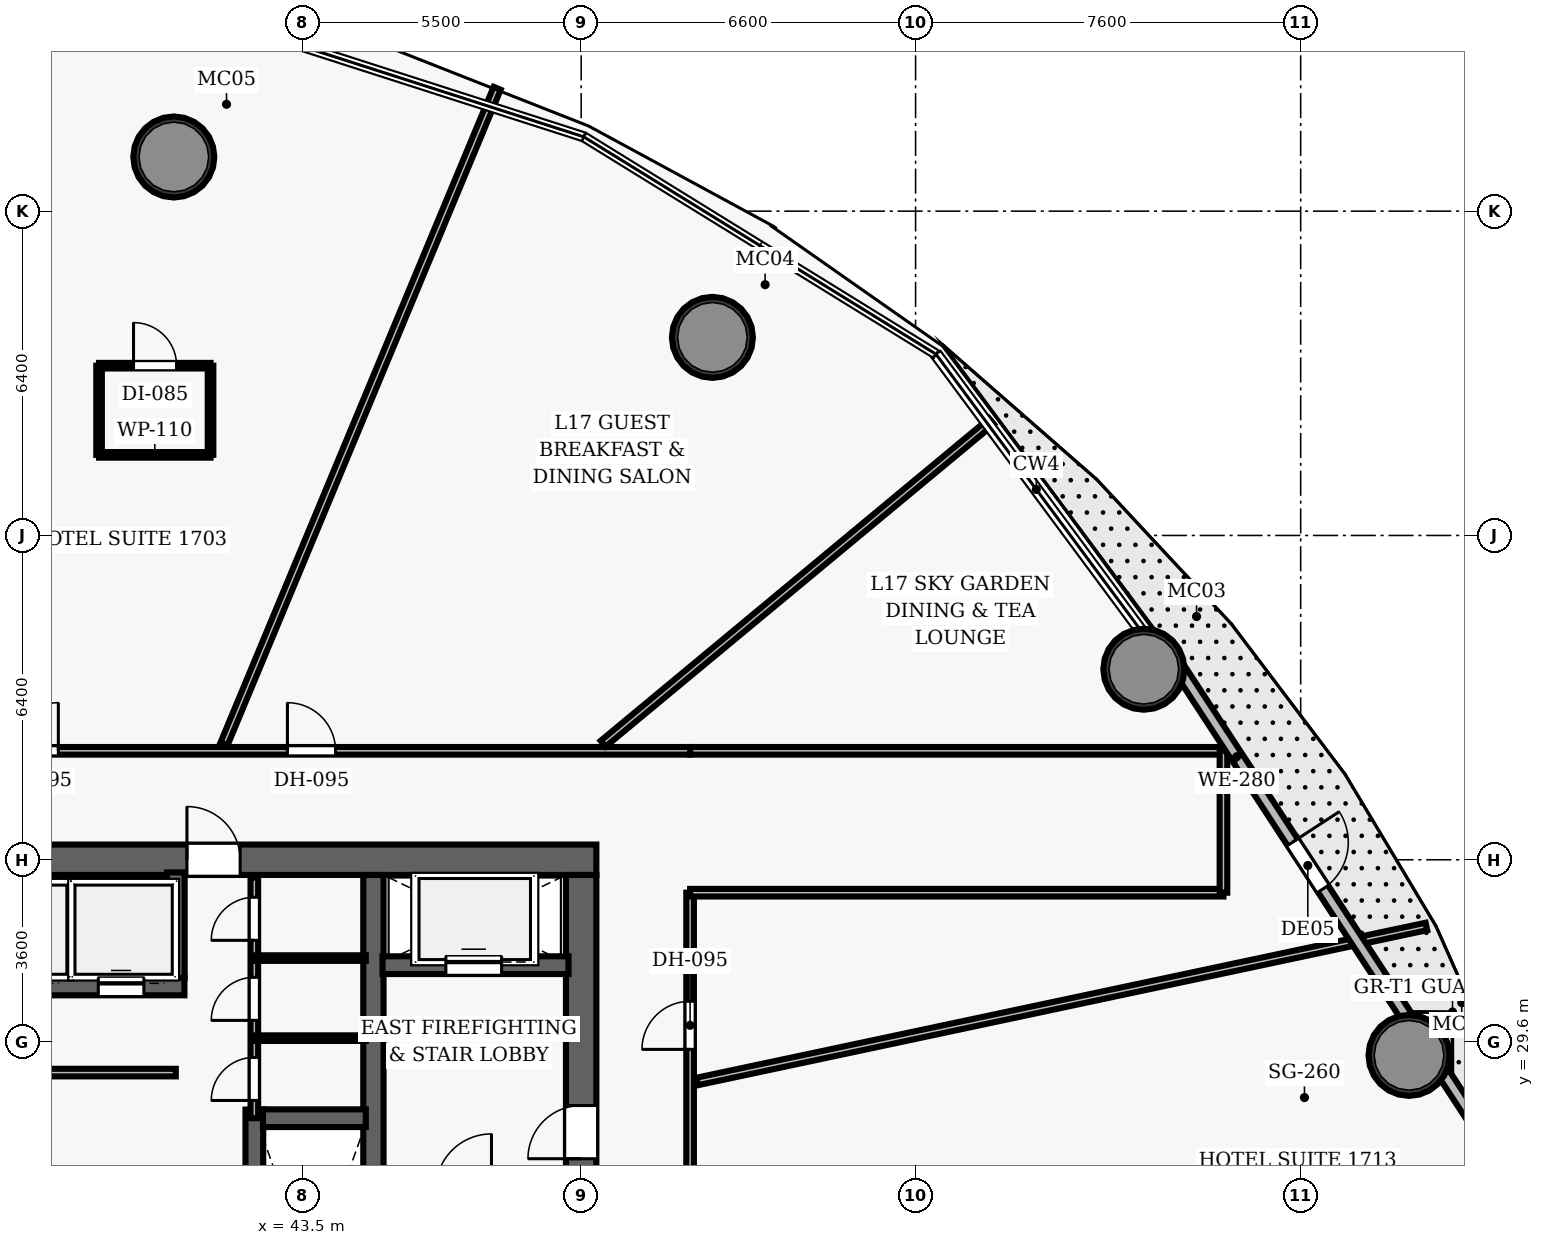
"""IFC4 building model, lengths in metres.
Left out: names, types, materials, properties, quantities, classifications, styles, units other than length and angle.
Written with IfcOpenShell. Run it as: python <this file> out.ifc"""

import sys

from ifc_helpers import new_model, si_unit, direction, frame, frame_2d, origin, origin_2d, place, context, subcontext, project, spatial, rectangle, hollow_circle, extrude, element, fill, save


model = new_model("IFC4")
c1 = context("Model", 3, precision=1e-05, world=origin(), true_north=direction((0.0, 1.0)))
c2 = subcontext(c1, "Body", "Model", "MODEL_VIEW")
j1 = project(units=[si_unit("LENGTHUNIT", "METRE"), si_unit("PLANEANGLEUNIT", "RADIAN")], contexts=[c1])
p1 = place(None, origin())
s1 = spatial("IfcSite", under=j1, at=p1, CompositionType="ELEMENT")
p2 = place(p1, origin())
s2 = spatial("IfcBuilding", under=s1, at=p2, CompositionType="ELEMENT")
p3 = place(p2, frame((0.0, 0.0, 76.4)))
s3 = spatial("IfcBuildingStorey", under=s2, at=p3, CompositionType="ELEMENT", Elevation=76.4)
p4 = place(p3, frame((26.7, 33.2, 0.0), z_axis=(0.0, 0.0, 1.0), x_axis=(1.0, 0.0, 0.0)))
e1 = element("IfcWall", 1, at=p4, inside=s3, PredefinedType="SHEAR", context=c2, shape_type="SweptSolid", body=[
    extrude(rectangle(XDim=22.6, YDim=0.6, at=frame_2d((11.3, 0.0))), origin(), (0.0, 0.0, 1.0), 3.5),
])
p5 = place(p4, frame((4.62, 0.0, 0.0)))
e2 = element("IfcOpeningElement", 2, at=p5, cuts=e1, PredefinedType="OPENING", context=c2, shape_type="SweptSolid", body=[
    extrude(rectangle(XDim=1.05, YDim=2.15, at=frame_2d((0.525, 1.075))), frame((0.0, 0.31, 0.0), z_axis=(0.0, -1.0, 0.0), x_axis=(1.0, 0.0, 0.0)), (0.0, 0.0, 1.0), 0.62),
])
p6 = place(p4, frame((14.52, 0.0, 0.0)))
e3 = element("IfcOpeningElement", 3, at=p6, cuts=e1, PredefinedType="OPENING", context=c2, shape_type="SweptSolid", body=[
    extrude(rectangle(XDim=1.05, YDim=2.15, at=frame_2d((0.525, 1.075))), frame((0.0, 0.31, 0.0), z_axis=(0.0, -1.0, 0.0), x_axis=(1.0, 0.0, 0.0)), (0.0, 0.0, 1.0), 0.62),
])
p7 = place(p3, frame((49.0, 19.1, 0.0), z_axis=(0.0, 0.0, 1.0), x_axis=(0.0, 1.0, 0.0)))
e4 = element("IfcWall", 4, at=p7, inside=s3, PredefinedType="SHEAR", context=c2, shape_type="SweptSolid", body=[
    extrude(rectangle(XDim=13.8, YDim=0.6, at=frame_2d((6.9, 0.0))), origin(), (0.0, 0.0, 1.0), 3.5),
])
p8 = place(p7, frame((8.2, 0.0, 0.0)))
e5 = element("IfcOpeningElement", 5, at=p8, cuts=e4, PredefinedType="OPENING", context=c2, shape_type="SweptSolid", body=[
    extrude(rectangle(XDim=1.05, YDim=2.15, at=frame_2d((0.525, 1.075))), frame((0.0, 0.31, 0.0), z_axis=(0.0, -1.0, 0.0), x_axis=(1.0, 0.0, 0.0)), (0.0, 0.0, 1.0), 0.62),
])
p9 = place(p3, frame((44.9, 19.1, 0.0), z_axis=(0.0, 0.0, 1.0), x_axis=(0.0, 1.0, 0.0)))
e6 = element("IfcWall", 6, at=p9, inside=s3, PredefinedType="SHEAR", context=c2, shape_type="SweptSolid", body=[
    extrude(rectangle(XDim=13.8, YDim=0.4, at=frame_2d((6.9, 0.0))), origin(), (0.0, 0.0, 1.0), 3.5),
])
for number, where, z_axis, x_axis in (
    (7, (65.339, 29.34, 0.0), (0.0, 0.0, 1.0), (1.0, 0.0, 0.0)),
    (8, (60.105, 36.96, 0.0), (0.0, 0.0, 1.0), (1.0, 0.0, 0.0)),
    (9, (51.59, 43.509, 0.0), (0.0, 0.0, 1.0), (1.0, 0.0, 0.0)),
    (10, (40.961, 47.069, 0.0), (0.0, 0.0, 1.0), (1.0, 0.0, 0.0)),
):
    element("IfcColumn", number, at=place(p3, frame(where, z_axis=z_axis, x_axis=x_axis)), inside=s3, PredefinedType="COLUMN", context=c2, shape_type="SweptSolid", body=[
        extrude(hollow_circle(Radius=0.8, WallThickness=0.06, at=origin_2d()), origin(), (0.0, 0.0, 1.0), 3.5),
    ])
p10 = place(p3, frame((45.08, 31.12, 0.0), z_axis=(0.0, 0.0, 1.0), x_axis=(1.0, 0.0, 0.0)))
e11 = element("IfcWall", 11, at=p10, inside=s3, PredefinedType="SHEAR", context=c2, shape_type="SweptSolid", body=[
    extrude(rectangle(XDim=3.67, YDim=0.35, at=frame_2d((1.835, 0.0))), origin(), (0.0, 0.0, 1.0), 2.6),
])
p11 = place(p10, frame((1.25, 0.0, 0.0)))
e12 = element("IfcOpeningElement", 12, at=p11, cuts=e11, PredefinedType="OPENING", context=c2, shape_type="SweptSolid", body=[
    extrude(rectangle(XDim=1.1, YDim=2.15, at=frame_2d((0.55, 1.075))), frame((0.0, 0.185, 0.0), z_axis=(0.0, -1.0, 0.0), x_axis=(1.0, 0.0, 0.0)), (0.0, 0.0, 1.0), 0.37),
])
p12 = place(p3, frame((42.55, 21.73, 0.0), z_axis=(0.0, 0.0, 1.0), x_axis=(0.0, 1.0, 0.0)))
e13 = element("IfcWall", 13, at=p12, inside=s3, PredefinedType="SHEAR", context=c2, shape_type="SweptSolid", body=[
    extrude(rectangle(XDim=6.54, YDim=0.35, at=frame_2d((3.27, 0.0))), origin(), (0.0, 0.0, 1.0), 2.6),
])
p13 = place(p3, frame((42.72, 28.1, 0.0), z_axis=(0.0, 0.0, 1.0), x_axis=(1.0, 0.0, 0.0)))
e14 = element("IfcWall", 14, at=p13, inside=s3, PredefinedType="SHEAR", context=c2, shape_type="SweptSolid", body=[
    extrude(rectangle(XDim=2.03, YDim=0.35, at=frame_2d((1.015, 0.0))), origin(), (0.0, 0.0, 1.0), 2.6),
])
p14 = place(p3, frame((34.81, 30.7, 0.0), z_axis=(0.0, 0.0, 1.0), x_axis=(1.0, 0.0, 0.0)))
e15 = element("IfcWall", 15, at=p14, inside=s3, PredefinedType="SHEAR", context=c2, shape_type="SweptSolid", body=[
    extrude(rectangle(XDim=6.36, YDim=0.35, at=frame_2d((3.18, 0.0))), origin(), (0.0, 0.0, 1.0), 2.6),
])
p15 = place(p14, frame((0.5, 0.0, 0.0)))
e16 = element("IfcOpeningElement", 16, at=p15, cuts=e15, PredefinedType="OPENING", context=c2, shape_type="SweptSolid", body=[
    extrude(rectangle(XDim=0.9, YDim=2.15, at=frame_2d((0.45, 1.075))), frame((0.0, 0.185, 0.0), z_axis=(0.0, -1.0, 0.0), x_axis=(1.0, 0.0, 0.0)), (0.0, 0.0, 1.0), 0.37),
])
p16 = place(p14, frame((2.58, 0.0, 0.0)))
e17 = element("IfcOpeningElement", 17, at=p16, cuts=e15, PredefinedType="OPENING", context=c2, shape_type="SweptSolid", body=[
    extrude(rectangle(XDim=0.9, YDim=2.15, at=frame_2d((0.45, 1.075))), frame((0.0, 0.185, 0.0), z_axis=(0.0, -1.0, 0.0), x_axis=(1.0, 0.0, 0.0)), (0.0, 0.0, 1.0), 0.37),
])
p17 = place(p14, frame((4.66, 0.0, 0.0)))
e18 = element("IfcOpeningElement", 18, at=p17, cuts=e15, PredefinedType="OPENING", context=c2, shape_type="SweptSolid", body=[
    extrude(rectangle(XDim=0.9, YDim=2.15, at=frame_2d((0.45, 1.075))), frame((0.0, 0.185, 0.0), z_axis=(0.0, -1.0, 0.0), x_axis=(1.0, 0.0, 0.0)), (0.0, 0.0, 1.0), 0.37),
])
p18 = place(p3, frame((41.0, 30.87, 0.0), z_axis=(0.0, 0.0, 1.0), x_axis=(0.0, 1.0, 0.0)))
e19 = element("IfcWall", 19, at=p18, inside=s3, PredefinedType="SHEAR", context=c2, shape_type="SweptSolid", body=[
    extrude(rectangle(XDim=2.08, YDim=0.35, at=frame_2d((1.04, 0.0))), origin(), (0.0, 0.0, 1.0), 2.6),
])
p19 = place(p3, frame((34.75, 29.0, 0.0), z_axis=(0.0, 0.0, 1.0), x_axis=(1.0, 0.0, 0.0)))
e20 = element("IfcWall", 20, at=p19, inside=s3, PredefinedType="PARTITIONING", context=c2, shape_type="SweptSolid", body=[
    extrude(rectangle(XDim=6.25, YDim=0.15, at=frame_2d((3.125, 0.0))), origin(), (0.0, 0.0, 1.0), 2.6),
])
p20 = place(p3, frame((42.55, 28.1, 0.0), z_axis=(0.0, 0.0, 1.0), x_axis=(0.0, 1.0, 0.0)))
e21 = element("IfcWall", 21, at=p20, inside=s3, PredefinedType="PARTITIONING", context=c2, shape_type="SweptSolid", body=[
    extrude(rectangle(XDim=4.75, YDim=0.15, at=frame_2d((2.375, 0.0))), origin(), (0.0, 0.0, 1.0), 2.6),
])
p21 = place(p20, frame((0.35, 0.0, 0.0)))
e22 = element("IfcOpeningElement", 22, at=p21, cuts=e21, PredefinedType="OPENING", context=c2, shape_type="SweptSolid", body=[
    extrude(rectangle(XDim=0.85, YDim=2.1, at=frame_2d((0.425, 1.05))), frame((0.0, 0.085, 0.0), z_axis=(0.0, -1.0, 0.0), x_axis=(1.0, 0.0, 0.0)), (0.0, 0.0, 1.0), 0.17),
])
p22 = place(p20, frame((1.93, 0.0, 0.0)))
e23 = element("IfcOpeningElement", 23, at=p22, cuts=e21, PredefinedType="OPENING", context=c2, shape_type="SweptSolid", body=[
    extrude(rectangle(XDim=0.85, YDim=2.1, at=frame_2d((0.425, 1.05))), frame((0.0, 0.085, 0.0), z_axis=(0.0, -1.0, 0.0), x_axis=(1.0, 0.0, 0.0)), (0.0, 0.0, 1.0), 0.17),
])
p23 = place(p20, frame((3.51, 0.0, 0.0)))
e24 = element("IfcOpeningElement", 24, at=p23, cuts=e21, PredefinedType="OPENING", context=c2, shape_type="SweptSolid", body=[
    extrude(rectangle(XDim=0.85, YDim=2.1, at=frame_2d((0.425, 1.05))), frame((0.0, 0.085, 0.0), z_axis=(0.0, -1.0, 0.0), x_axis=(1.0, 0.0, 0.0)), (0.0, 0.0, 1.0), 0.17),
])
for number, where, z_axis, x_axis in (
    (25, (42.55, 29.68, 0.0), (0.0, 0.0, 1.0), (1.0, 0.0, 0.0)),
    (26, (42.55, 31.26, 0.0), (0.0, 0.0, 1.0), (1.0, 0.0, 0.0)),
):
    element("IfcWall", number, at=place(p3, frame(where, z_axis=z_axis, x_axis=x_axis)), inside=s3, PredefinedType="PARTITIONING", context=c2, shape_type="SweptSolid", body=[
        extrude(rectangle(XDim=2.2, YDim=0.11, at=frame_2d((1.1, 0.0))), origin(), (0.0, 0.0, 1.0), 2.6),
    ])
p24 = place(p3, frame((27.65, 35.35, 0.0), z_axis=(0.0, 0.0, 1.0), x_axis=(1.0, 0.0, 0.0)))
e27 = element("IfcWall", 27, at=p24, inside=s3, PredefinedType="PARTITIONING", context=c2, shape_type="SweptSolid", body=[
    extrude(rectangle(XDim=23.5, YDim=0.15, at=frame_2d((11.75, 0.0))), origin(), (0.0, 0.0, 1.0), 2.6),
])
p25 = place(p24, frame((15.553, 0.0, 0.0)))
e28 = element("IfcOpeningElement", 28, at=p25, cuts=e27, PredefinedType="OPENING", context=c2, shape_type="SweptSolid", body=[
    extrude(rectangle(XDim=0.95, YDim=2.15, at=frame_2d((0.475, 1.075))), frame((0.0, 0.085, 0.0), z_axis=(0.0, -1.0, 0.0), x_axis=(1.0, 0.0, 0.0)), (0.0, 0.0, 1.0), 0.17),
])
p26 = place(p24, frame((10.082, 0.0, 0.0)))
e29 = element("IfcOpeningElement", 29, at=p26, cuts=e27, PredefinedType="OPENING", context=c2, shape_type="SweptSolid", body=[
    extrude(rectangle(XDim=0.95, YDim=2.15, at=frame_2d((0.475, 1.075))), frame((0.0, 0.085, 0.0), z_axis=(0.0, -1.0, 0.0), x_axis=(1.0, 0.0, 0.0)), (0.0, 0.0, 1.0), 0.17),
])
p27 = place(p24, frame((7.866, 0.0, 0.0)))
e30 = element("IfcOpeningElement", 30, at=p27, cuts=e27, PredefinedType="OPENING", context=c2, shape_type="SweptSolid", body=[
    extrude(rectangle(XDim=0.95, YDim=2.15, at=frame_2d((0.475, 1.075))), frame((0.0, 0.085, 0.0), z_axis=(0.0, -1.0, 0.0), x_axis=(1.0, 0.0, 0.0)), (0.0, 0.0, 1.0), 0.17),
])
p28 = place(p3, frame((51.15, 16.65, 0.0), z_axis=(0.0, 0.0, 1.0), x_axis=(0.0, 1.0, 0.0)))
e31 = element("IfcWall", 31, at=p28, inside=s3, PredefinedType="PARTITIONING", context=c2, shape_type="SweptSolid", body=[
    extrude(rectangle(XDim=15.9, YDim=0.15, at=frame_2d((7.95, 0.0))), origin(), (0.0, 0.0, 1.0), 2.6),
])
p29 = place(p28, frame((12.808, 0.0, 0.0)))
e32 = element("IfcOpeningElement", 32, at=p29, cuts=e31, PredefinedType="OPENING", context=c2, shape_type="SweptSolid", body=[
    extrude(rectangle(XDim=0.95, YDim=2.15, at=frame_2d((0.475, 1.075))), frame((0.0, 0.085, 0.0), z_axis=(0.0, -1.0, 0.0), x_axis=(1.0, 0.0, 0.0)), (0.0, 0.0, 1.0), 0.17),
])
p30 = place(p28, frame((3.964, 0.0, 0.0)))
e33 = element("IfcOpeningElement", 33, at=p30, cuts=e31, PredefinedType="OPENING", context=c2, shape_type="SweptSolid", body=[
    extrude(rectangle(XDim=0.95, YDim=2.15, at=frame_2d((0.475, 1.075))), frame((0.0, 0.085, 0.0), z_axis=(0.0, -1.0, 0.0), x_axis=(1.0, 0.0, 0.0)), (0.0, 0.0, 1.0), 0.17),
])
p31 = place(p28, frame((7.35, 0.0, 0.0)))
e34 = element("IfcOpeningElement", 34, at=p31, cuts=e31, PredefinedType="OPENING", context=c2, shape_type="SweptSolid", body=[
    extrude(rectangle(XDim=0.95, YDim=2.15, at=frame_2d((0.475, 1.075))), frame((0.0, 0.085, 0.0), z_axis=(0.0, -1.0, 0.0), x_axis=(1.0, 0.0, 0.0)), (0.0, 0.0, 1.0), 0.17),
])
for number, where, z_axis, x_axis in (
    (35, (51.15, 35.35, 0.0), (0.0, 0.0, 1.0), (1.0, 0.0, 0.0)),
    (36, (51.15, 32.55, 0.0), (0.0, 0.0, 1.0), (1.0, 0.0, 0.0)),
):
    element("IfcWall", number, at=place(p3, frame(where, z_axis=z_axis, x_axis=x_axis)), inside=s3, PredefinedType="PARTITIONING", context=c2, shape_type="SweptSolid", body=[
        extrude(rectangle(XDim=10.526, YDim=0.15, at=frame_2d((5.263, 0.0))), origin(), (0.0, 0.0, 1.0), 2.6),
    ])
p32 = place(p3, frame((61.676, 32.55, 0.0), z_axis=(0.0, 0.0, 1.0), x_axis=(0.0, 1.0, 0.0)))
e37 = element("IfcWall", 37, at=p32, inside=s3, PredefinedType="PARTITIONING", context=c2, shape_type="SweptSolid", body=[
    extrude(rectangle(XDim=2.8, YDim=0.15, at=frame_2d((1.4, 0.0))), origin(), (0.0, 0.0, 1.0), 2.6),
])
p33 = place(p3, frame((51.29, 28.825, 0.0), z_axis=(0.0, 0.0, 1.0), x_axis=(0.978150246992, 0.207899240764, 0.0)))
e38 = element("IfcWall", 38, at=p33, inside=s3, PredefinedType="PARTITIONING", context=c2, shape_type="SweptSolid", body=[
    extrude(rectangle(XDim=14.713, YDim=0.15, at=frame_2d((7.356, 0.0))), origin(), (0.0, 0.0, 1.0), 2.6),
])
p34 = place(p3, frame((49.434, 35.49, 0.0), z_axis=(0.0, 0.0, 1.0), x_axis=(0.769487375521, 0.638662022445, 0.0)))
e39 = element("IfcWall", 39, at=p34, inside=s3, PredefinedType="PARTITIONING", context=c2, shape_type="SweptSolid", body=[
    extrude(rectangle(XDim=9.961, YDim=0.15, at=frame_2d((4.981, 0.0))), origin(), (0.0, 0.0, 1.0), 2.6),
])
p35 = place(p3, frame((41.953, 35.49, 0.0), z_axis=(0.0, 0.0, 1.0), x_axis=(0.384537444803, 0.923109394137, 0.0)))
e40 = element("IfcWall", 40, at=p35, inside=s3, PredefinedType="PARTITIONING", context=c2, shape_type="SweptSolid", body=[
    extrude(rectangle(XDim=14.013, YDim=0.15, at=frame_2d((7.006, 0.0))), origin(), (0.0, 0.0, 1.0), 2.6),
])
p36 = place(p3, frame((39.486, 41.19, 0.0), z_axis=(0.0, 0.0, 1.0), x_axis=(1.0, 0.0, 0.0)))
e41 = element("IfcWall", 41, at=p36, inside=s3, PredefinedType="PARTITIONING", context=c2, shape_type="SweptSolid", body=[
    extrude(rectangle(XDim=2.2, YDim=0.11, at=frame_2d((1.1, 0.0))), origin(), (0.0, 0.0, 1.0), 2.6),
])
p37 = place(p3, frame((39.486, 42.95, 0.0), z_axis=(0.0, 0.0, 1.0), x_axis=(1.0, 0.0, 0.0)))
e42 = element("IfcWall", 42, at=p37, inside=s3, PredefinedType="PARTITIONING", context=c2, shape_type="SweptSolid", body=[
    extrude(rectangle(XDim=2.2, YDim=0.11, at=frame_2d((1.1, 0.0))), origin(), (0.0, 0.0, 1.0), 2.6),
])
p38 = place(p37, frame((0.68, 0.0, 0.0)))
e43 = element("IfcOpeningElement", 43, at=p38, cuts=e42, PredefinedType="OPENING", context=c2, shape_type="SweptSolid", body=[
    extrude(rectangle(XDim=0.85, YDim=2.1, at=frame_2d((0.425, 1.05))), frame((0.0, 0.065, 0.0), z_axis=(0.0, -1.0, 0.0), x_axis=(1.0, 0.0, 0.0)), (0.0, 0.0, 1.0), 0.13),
])
for number, where, z_axis, x_axis in (
    (44, (39.486, 41.19, 0.0), (0.0, 0.0, 1.0), (0.0, 1.0, 0.0)),
    (45, (41.686, 41.19, 0.0), (0.0, 0.0, 1.0), (0.0, 1.0, 0.0)),
):
    element("IfcWall", number, at=place(p3, frame(where, z_axis=z_axis, x_axis=x_axis)), inside=s3, PredefinedType="PARTITIONING", context=c2, shape_type="SweptSolid", body=[
        extrude(rectangle(XDim=1.76, YDim=0.11, at=frame_2d((0.88, 0.0))), origin(), (0.0, 0.0, 1.0), 2.6),
    ])
p39 = place(p3, frame((60.603, 37.276, 0.0), z_axis=(0.0, 0.0, 1.0), x_axis=(0.547121449086, -0.837053236031, 0.0)))
e46 = element("IfcWall", 46, at=p39, inside=s3, PredefinedType="SOLIDWALL", context=c2, shape_type="SweptSolid", body=[
    extrude(rectangle(XDim=13.474, YDim=0.24, at=frame_2d((6.737, 0.0))), origin(), (0.0, 0.0, 1.0), 2.45),
])
p40 = place(p39, frame((4.455, 0.0, 0.0)))
e47 = element("IfcOpeningElement", 47, at=p40, cuts=e46, PredefinedType="OPENING", context=c2, shape_type="SweptSolid", body=[
    extrude(rectangle(XDim=1.1, YDim=2.2, at=frame_2d((0.55, 1.1))), frame((0.0, 0.13, 0.0), z_axis=(0.0, -1.0, 0.0), x_axis=(1.0, 0.0, 0.0)), (0.0, 0.0, 1.0), 0.26),
])
p41 = place(p8, origin())
e48 = element("IfcDoor", 48, at=p41, inside=s3, OperationType="SINGLE_SWING_LEFT", PredefinedType="DOOR", context=c2, shape_type="SweptSolid", body=[
    extrude(rectangle(XDim=1.05, YDim=2.15, at=frame_2d((0.525, 1.075))), frame((0.0, 0.025, 0.0), z_axis=(0.0, -1.0, 0.0), x_axis=(1.0, 0.0, 0.0)), (0.0, 0.0, 1.0), 0.05),
])
fill(e5, e48)
p42 = place(p6, origin())
e49 = element("IfcDoor", 49, at=p42, inside=s3, OperationType="SINGLE_SWING_LEFT", PredefinedType="DOOR", context=c2, shape_type="SweptSolid", body=[
    extrude(rectangle(XDim=1.05, YDim=2.15, at=frame_2d((0.525, 1.075))), frame((0.0, 0.025, 0.0), z_axis=(0.0, -1.0, 0.0), x_axis=(1.0, 0.0, 0.0)), (0.0, 0.0, 1.0), 0.05),
])
fill(e3, e49)
p43 = place(p21, origin())
e50 = element("IfcDoor", 50, at=p43, inside=s3, OperationType="SINGLE_SWING_LEFT", PredefinedType="DOOR", context=c2, shape_type="SweptSolid", body=[
    extrude(rectangle(XDim=0.85, YDim=2.1, at=frame_2d((0.425, 1.05))), frame((0.0, 0.025, 0.0), z_axis=(0.0, -1.0, 0.0), x_axis=(1.0, 0.0, 0.0)), (0.0, 0.0, 1.0), 0.05),
])
fill(e22, e50)
p44 = place(p22, origin())
e51 = element("IfcDoor", 51, at=p44, inside=s3, OperationType="SINGLE_SWING_LEFT", PredefinedType="DOOR", context=c2, shape_type="SweptSolid", body=[
    extrude(rectangle(XDim=0.85, YDim=2.1, at=frame_2d((0.425, 1.05))), frame((0.0, 0.025, 0.0), z_axis=(0.0, -1.0, 0.0), x_axis=(1.0, 0.0, 0.0)), (0.0, 0.0, 1.0), 0.05),
])
fill(e23, e51)
p45 = place(p23, origin())
e52 = element("IfcDoor", 52, at=p45, inside=s3, OperationType="SINGLE_SWING_LEFT", PredefinedType="DOOR", context=c2, shape_type="SweptSolid", body=[
    extrude(rectangle(XDim=0.85, YDim=2.1, at=frame_2d((0.425, 1.05))), frame((0.0, 0.025, 0.0), z_axis=(0.0, -1.0, 0.0), x_axis=(1.0, 0.0, 0.0)), (0.0, 0.0, 1.0), 0.05),
])
fill(e24, e52)
p46 = place(p29, origin())
e53 = element("IfcDoor", 53, at=p46, inside=s3, OperationType="SINGLE_SWING_LEFT", PredefinedType="DOOR", context=c2, shape_type="SweptSolid", body=[
    extrude(rectangle(XDim=0.95, YDim=2.15, at=frame_2d((0.475, 1.075))), frame((0.0, 0.025, 0.0), z_axis=(0.0, -1.0, 0.0), x_axis=(1.0, 0.0, 0.0)), (0.0, 0.0, 1.0), 0.05),
])
fill(e32, e53)
p47 = place(p25, origin())
e54 = element("IfcDoor", 54, at=p47, inside=s3, OperationType="SINGLE_SWING_LEFT", PredefinedType="DOOR", context=c2, shape_type="SweptSolid", body=[
    extrude(rectangle(XDim=0.95, YDim=2.15, at=frame_2d((0.475, 1.075))), frame((0.0, 0.025, 0.0), z_axis=(0.0, -1.0, 0.0), x_axis=(1.0, 0.0, 0.0)), (0.0, 0.0, 1.0), 0.05),
])
fill(e28, e54)
p48 = place(p26, origin())
e55 = element("IfcDoor", 55, at=p48, inside=s3, OperationType="SINGLE_SWING_RIGHT", PredefinedType="DOOR", context=c2, shape_type="SweptSolid", body=[
    extrude(rectangle(XDim=0.95, YDim=2.15, at=frame_2d((0.475, 1.075))), frame((0.0, 0.025, 0.0), z_axis=(0.0, -1.0, 0.0), x_axis=(1.0, 0.0, 0.0)), (0.0, 0.0, 1.0), 0.05),
])
fill(e29, e55)
p49 = place(p38, origin())
e56 = element("IfcDoor", 56, at=p49, inside=s3, OperationType="SINGLE_SWING_LEFT", PredefinedType="DOOR", context=c2, shape_type="SweptSolid", body=[
    extrude(rectangle(XDim=0.85, YDim=2.1, at=frame_2d((0.425, 1.05))), frame((0.0, 0.025, 0.0), z_axis=(0.0, -1.0, 0.0), x_axis=(1.0, 0.0, 0.0)), (0.0, 0.0, 1.0), 0.05),
])
fill(e43, e56)
p50 = place(p17, origin())
e57 = element("IfcDoor", 57, at=p50, inside=s3, OperationType="SLIDING_TO_LEFT", PredefinedType="DOOR", context=c2, shape_type="SweptSolid", body=[
    extrude(rectangle(XDim=0.9, YDim=2.15, at=frame_2d((0.45, 1.075))), frame((0.0, 0.025, 0.0), z_axis=(0.0, -1.0, 0.0), x_axis=(1.0, 0.0, 0.0)), (0.0, 0.0, 1.0), 0.05),
])
fill(e18, e57)
p51 = place(p11, origin())
e58 = element("IfcDoor", 58, at=p51, inside=s3, OperationType="SLIDING_TO_LEFT", PredefinedType="DOOR", context=c2, shape_type="SweptSolid", body=[
    extrude(rectangle(XDim=1.1, YDim=2.15, at=frame_2d((0.55, 1.075))), frame((0.0, 0.025, 0.0), z_axis=(0.0, -1.0, 0.0), x_axis=(1.0, 0.0, 0.0)), (0.0, 0.0, 1.0), 0.05),
])
fill(e12, e58)
p52 = place(p40, origin())
e59 = element("IfcDoor", 59, at=p52, inside=s3, OperationType="SINGLE_SWING_LEFT", PredefinedType="DOOR", context=c2, shape_type="SweptSolid", body=[
    extrude(rectangle(XDim=1.1, YDim=2.2, at=frame_2d((0.55, 1.1))), frame((0.0, 0.025, 0.0), z_axis=(0.0, -1.0, 0.0), x_axis=(1.0, 0.0, 0.0)), (0.0, 0.0, 1.0), 0.05),
])
fill(e47, e59)
save(model, sys.argv[1])
